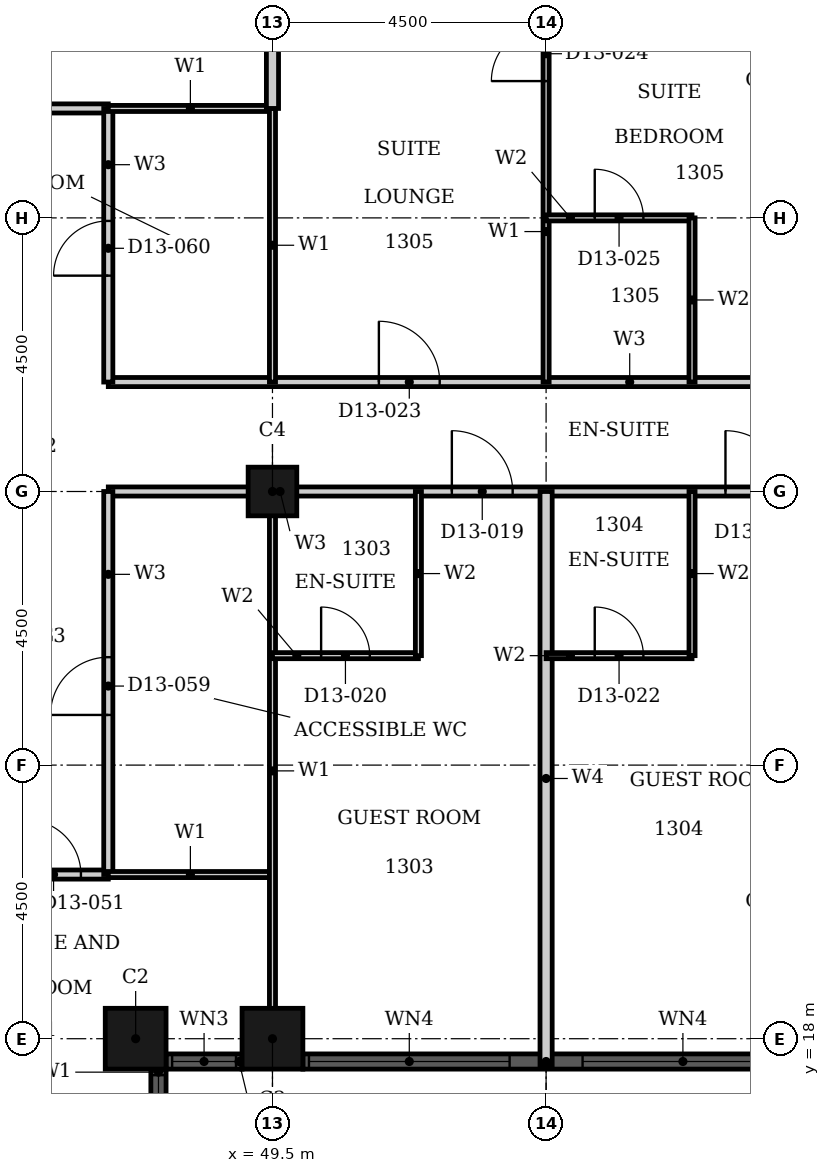
"""IFC4 building model, lengths in metres.
Left out: names, types, materials, properties, quantities, classifications, styles, units other than length and angle.
Written with IfcOpenShell. Run it as: python <this file> out.ifc"""

import sys

from ifc_helpers import new_model, si_unit, direction, frame, frame_2d, origin, origin_2d, place, context, subcontext, project, spatial, rectangle, hollow_rectangle, extrude, element, fill, save


model = new_model("IFC4")
c1 = context("Model", 3, precision=1e-05, world=origin(), true_north=direction((0.0, 1.0)))
c2 = subcontext(c1, "Body", "Model", "MODEL_VIEW")
j1 = project(units=[si_unit("LENGTHUNIT", "METRE"), si_unit("PLANEANGLEUNIT", "RADIAN")], contexts=[c1])
p1 = place(None, origin())
s1 = spatial("IfcSite", under=j1, at=p1, CompositionType="ELEMENT")
p2 = place(p1, origin())
s2 = spatial("IfcBuilding", under=s1, at=p2, CompositionType="ELEMENT")
p3 = place(p2, frame((0.0, 0.0, 60.0)))
s3 = spatial("IfcBuildingStorey", under=s2, at=p3, CompositionType="ELEMENT", Elevation=60.0)
for number, where, z_axis, x_axis in (
    (1, (47.25, 18.0, 0.0), (0.0, 0.0, 1.0), (1.0, 0.0, 0.0)),
    (2, (49.5, 18.0, 0.0), (0.0, 0.0, 1.0), (1.0, 0.0, 0.0)),
):
    element("IfcColumn", number, at=place(p3, frame(where, z_axis=z_axis, x_axis=x_axis)), inside=s3, PredefinedType="COLUMN", context=c2, shape_type="SweptSolid", body=[
        extrude(hollow_rectangle(XDim=1.0, YDim=1.0, WallThickness=0.032, at=origin_2d()), origin(), (0.0, 0.0, 1.0), 3.6),
    ])
p4 = place(p3, frame((49.5, 27.0, 0.0), z_axis=(0.0, 0.0, 1.0), x_axis=(1.0, 0.0, 0.0)))
e3 = element("IfcColumn", 3, at=p4, inside=s3, PredefinedType="COLUMN", context=c2, shape_type="SweptSolid", body=[
    extrude(hollow_rectangle(XDim=0.8, YDim=0.8, WallThickness=0.025, at=origin_2d()), origin(), (0.0, 0.0, 1.0), 3.6),
])
p5 = place(p3, frame((47.625, 16.25, 0.0), z_axis=(0.0, 0.0, 1.0), x_axis=(0.0, 1.0, 0.0)))
e4 = element("IfcWall", 4, at=p5, inside=s3, PredefinedType="SOLIDWALL", context=c2, shape_type="SweptSolid", body=[
    extrude(rectangle(XDim=1.25, YDim=0.25, at=frame_2d((0.625, 0.0))), origin(), (0.0, 0.0, 1.0), 3.6),
])
p6 = place(p5, frame((0.1, 0.0, 0.9)))
e5 = element("IfcOpeningElement", 5, at=p6, cuts=e4, PredefinedType="OPENING", context=c2, shape_type="SweptSolid", body=[
    extrude(rectangle(XDim=1.05, YDim=2.08, at=frame_2d((0.525, 1.04))), frame((0.0, 0.135, 0.0), z_axis=(0.0, -1.0, 0.0), x_axis=(1.0, 0.0, 0.0)), (0.0, 0.0, 1.0), 0.27),
])
p7 = place(p3, frame((47.75, 17.625, 0.0), z_axis=(0.0, 0.0, 1.0), x_axis=(1.0, 0.0, 0.0)))
e6 = element("IfcWall", 6, at=p7, inside=s3, PredefinedType="SOLIDWALL", context=c2, shape_type="SweptSolid", body=[
    extrude(rectangle(XDim=1.25, YDim=0.25, at=frame_2d((0.625, 0.0))), origin(), (0.0, 0.0, 1.0), 3.6),
])
p8 = place(p7, frame((0.1, 0.0, 0.9)))
e7 = element("IfcOpeningElement", 7, at=p8, cuts=e6, PredefinedType="OPENING", context=c2, shape_type="SweptSolid", body=[
    extrude(rectangle(XDim=1.05, YDim=2.08, at=frame_2d((0.525, 1.04))), frame((0.0, 0.135, 0.0), z_axis=(0.0, -1.0, 0.0), x_axis=(1.0, 0.0, 0.0)), (0.0, 0.0, 1.0), 0.27),
])
p9 = place(p3, frame((50.0, 17.625, 0.0), z_axis=(0.0, 0.0, 1.0), x_axis=(1.0, 0.0, 0.0)))
e8 = element("IfcWall", 8, at=p9, inside=s3, PredefinedType="SOLIDWALL", context=c2, shape_type="SweptSolid", body=[
    extrude(rectangle(XDim=8.0, YDim=0.25, at=frame_2d((4.0, 0.0))), origin(), (0.0, 0.0, 1.0), 3.6),
])
p10 = place(p9, frame((0.1, 0.0, 0.9)))
e9 = element("IfcOpeningElement", 9, at=p10, cuts=e8, PredefinedType="OPENING", context=c2, shape_type="SweptSolid", body=[
    extrude(rectangle(XDim=3.3, YDim=2.08, at=frame_2d((1.65, 1.04))), frame((0.0, 0.135, 0.0), z_axis=(0.0, -1.0, 0.0), x_axis=(1.0, 0.0, 0.0)), (0.0, 0.0, 1.0), 0.27),
])
p11 = place(p9, frame((4.6, 0.0, 0.9)))
e10 = element("IfcOpeningElement", 10, at=p11, cuts=e8, PredefinedType="OPENING", context=c2, shape_type="SweptSolid", body=[
    extrude(rectangle(XDim=3.3, YDim=2.08, at=frame_2d((1.65, 1.04))), frame((0.0, 0.135, 0.0), z_axis=(0.0, -1.0, 0.0), x_axis=(1.0, 0.0, 0.0)), (0.0, 0.0, 1.0), 0.27),
])
p12 = place(p3, frame((31.5, 20.7, 0.0), z_axis=(0.0, 0.0, 1.0), x_axis=(1.0, 0.0, 0.0)))
e11 = element("IfcWall", 11, at=p12, inside=s3, PredefinedType="PARTITIONING", context=c2, shape_type="SweptSolid", body=[
    extrude(rectangle(XDim=15.3, YDim=0.15, at=frame_2d((7.65, 0.0))), origin(), (0.0, 0.0, 1.0), 3.3),
])
p13 = place(p12, frame((11.95, 0.0, 0.0)))
e12 = element("IfcOpeningElement", 12, at=p13, cuts=e11, PredefinedType="OPENING", context=c2, shape_type="SweptSolid", body=[
    extrude(rectangle(XDim=1.0, YDim=2.1, at=frame_2d((0.5, 1.05))), frame((0.0, 0.085, 0.0), z_axis=(0.0, -1.0, 0.0), x_axis=(1.0, 0.0, 0.0)), (0.0, 0.0, 1.0), 0.17),
])
p14 = place(p12, frame((13.95, 0.0, 0.0)))
e13 = element("IfcOpeningElement", 13, at=p14, cuts=e11, PredefinedType="OPENING", context=c2, shape_type="SweptSolid", body=[
    extrude(rectangle(XDim=0.9, YDim=2.1, at=frame_2d((0.45, 1.05))), frame((0.0, 0.085, 0.0), z_axis=(0.0, -1.0, 0.0), x_axis=(1.0, 0.0, 0.0)), (0.0, 0.0, 1.0), 0.17),
])
p15 = place(p12, frame((1.05, 0.0, 0.0)))
e14 = element("IfcOpeningElement", 14, at=p15, cuts=e11, PredefinedType="OPENING", context=c2, shape_type="SweptSolid", body=[
    extrude(rectangle(XDim=0.9, YDim=2.1, at=frame_2d((0.45, 1.05))), frame((0.0, 0.085, 0.0), z_axis=(0.0, -1.0, 0.0), x_axis=(1.0, 0.0, 0.0)), (0.0, 0.0, 1.0), 0.17),
])
p16 = place(p12, frame((5.55, 0.0, 0.0)))
e15 = element("IfcOpeningElement", 15, at=p16, cuts=e11, PredefinedType="OPENING", context=c2, shape_type="SweptSolid", body=[
    extrude(rectangle(XDim=0.9, YDim=2.1, at=frame_2d((0.45, 1.05))), frame((0.0, 0.085, 0.0), z_axis=(0.0, -1.0, 0.0), x_axis=(1.0, 0.0, 0.0)), (0.0, 0.0, 1.0), 0.17),
])
p17 = place(p3, frame((46.8, 27.0, 0.0), z_axis=(0.0, 0.0, 1.0), x_axis=(1.0, 0.0, 0.0)))
e16 = element("IfcWall", 16, at=p17, inside=s3, PredefinedType="PARTITIONING", context=c2, shape_type="SweptSolid", body=[
    extrude(rectangle(XDim=11.7, YDim=0.15, at=frame_2d((5.85, 0.0))), origin(), (0.0, 0.0, 1.0), 2.58),
])
p18 = place(p17, frame((5.65, 0.0, 0.0)))
e17 = element("IfcOpeningElement", 17, at=p18, cuts=e16, PredefinedType="OPENING", context=c2, shape_type="SweptSolid", body=[
    extrude(rectangle(XDim=1.0, YDim=2.1, at=frame_2d((0.5, 1.05))), frame((0.0, 0.085, 0.0), z_axis=(0.0, -1.0, 0.0), x_axis=(1.0, 0.0, 0.0)), (0.0, 0.0, 1.0), 0.17),
])
p19 = place(p17, frame((10.15, 0.0, 0.0)))
e18 = element("IfcOpeningElement", 18, at=p19, cuts=e16, PredefinedType="OPENING", context=c2, shape_type="SweptSolid", body=[
    extrude(rectangle(XDim=1.0, YDim=2.1, at=frame_2d((0.5, 1.05))), frame((0.0, 0.085, 0.0), z_axis=(0.0, -1.0, 0.0), x_axis=(1.0, 0.0, 0.0)), (0.0, 0.0, 1.0), 0.17),
])
p20 = place(p3, frame((46.8, 28.8, 0.0), z_axis=(0.0, 0.0, 1.0), x_axis=(1.0, 0.0, 0.0)))
e19 = element("IfcWall", 19, at=p20, inside=s3, PredefinedType="PARTITIONING", context=c2, shape_type="SweptSolid", body=[
    extrude(rectangle(XDim=11.7, YDim=0.15, at=frame_2d((5.85, 0.0))), origin(), (0.0, 0.0, 1.0), 3.3),
])
p21 = place(p20, frame((4.45, 0.0, 0.0)))
e20 = element("IfcOpeningElement", 20, at=p21, cuts=e19, PredefinedType="OPENING", context=c2, shape_type="SweptSolid", body=[
    extrude(rectangle(XDim=1.0, YDim=2.1, at=frame_2d((0.5, 1.05))), frame((0.0, 0.085, 0.0), z_axis=(0.0, -1.0, 0.0), x_axis=(1.0, 0.0, 0.0)), (0.0, 0.0, 1.0), 0.17),
])
p22 = place(p3, frame((33.3, 33.3, 0.0), z_axis=(0.0, 0.0, 1.0), x_axis=(1.0, 0.0, 0.0)))
e21 = element("IfcWall", 21, at=p22, inside=s3, PredefinedType="PARTITIONING", context=c2, shape_type="SweptSolid", body=[
    extrude(rectangle(XDim=13.5, YDim=0.15, at=frame_2d((6.75, 0.0))), origin(), (0.0, 0.0, 1.0), 3.3),
])
p23 = place(p22, frame((10.15, 0.0, 0.0)))
e22 = element("IfcOpeningElement", 22, at=p23, cuts=e21, PredefinedType="OPENING", context=c2, shape_type="SweptSolid", body=[
    extrude(rectangle(XDim=1.0, YDim=2.1, at=frame_2d((0.5, 1.05))), frame((0.0, 0.085, 0.0), z_axis=(0.0, -1.0, 0.0), x_axis=(1.0, 0.0, 0.0)), (0.0, 0.0, 1.0), 0.17),
])
p24 = place(p22, frame((3.15, 0.0, 0.0)))
e23 = element("IfcOpeningElement", 23, at=p24, cuts=e21, PredefinedType="OPENING", context=c2, shape_type="SweptSolid", body=[
    extrude(rectangle(XDim=0.9, YDim=2.1, at=frame_2d((0.45, 1.05))), frame((0.0, 0.085, 0.0), z_axis=(0.0, -1.0, 0.0), x_axis=(1.0, 0.0, 0.0)), (0.0, 0.0, 1.0), 0.17),
])
p25 = place(p3, frame((46.8, 28.8, 0.0), z_axis=(0.0, 0.0, 1.0), x_axis=(0.0, 1.0, 0.0)))
e24 = element("IfcWall", 24, at=p25, inside=s3, PredefinedType="PARTITIONING", context=c2, shape_type="SweptSolid", body=[
    extrude(rectangle(XDim=4.5, YDim=0.15, at=frame_2d((2.25, 0.0))), origin(), (0.0, 0.0, 1.0), 3.3),
])
p26 = place(p25, frame((1.75, 0.0, 0.0)))
e25 = element("IfcOpeningElement", 25, at=p26, cuts=e24, PredefinedType="OPENING", context=c2, shape_type="SweptSolid", body=[
    extrude(rectangle(XDim=0.9, YDim=2.1, at=frame_2d((0.45, 1.05))), frame((0.0, 0.085, 0.0), z_axis=(0.0, -1.0, 0.0), x_axis=(1.0, 0.0, 0.0)), (0.0, 0.0, 1.0), 0.17),
])
p27 = place(p3, frame((46.8, 20.7, 0.0), z_axis=(0.0, 0.0, 1.0), x_axis=(0.0, 1.0, 0.0)))
e26 = element("IfcWall", 26, at=p27, inside=s3, PredefinedType="PARTITIONING", context=c2, shape_type="SweptSolid", body=[
    extrude(rectangle(XDim=6.3, YDim=0.15, at=frame_2d((3.15, 0.0))), origin(), (0.0, 0.0, 1.0), 3.3),
])
p28 = place(p27, frame((2.625, 0.0, 0.0)))
e27 = element("IfcOpeningElement", 27, at=p28, cuts=e26, PredefinedType="OPENING", context=c2, shape_type="SweptSolid", body=[
    extrude(rectangle(XDim=0.95, YDim=2.1, at=frame_2d((0.475, 1.05))), frame((0.0, 0.085, 0.0), z_axis=(0.0, -1.0, 0.0), x_axis=(1.0, 0.0, 0.0)), (0.0, 0.0, 1.0), 0.17),
])
for number, where, z_axis, x_axis in (
    (28, (46.8, 20.7, 0.0), (0.0, 0.0, 1.0), (1.0, 0.0, 0.0)),
    (29, (46.8, 33.3, 0.0), (0.0, 0.0, 1.0), (1.0, 0.0, 0.0)),
):
    element("IfcWall", number, at=place(p3, frame(where, z_axis=z_axis, x_axis=x_axis)), inside=s3, PredefinedType="PARTITIONING", context=c2, shape_type="SweptSolid", body=[
        extrude(rectangle(XDim=2.7, YDim=0.1, at=frame_2d((1.35, 0.0))), origin(), (0.0, 0.0, 1.0), 3.3),
    ])
p29 = place(p3, frame((49.5, 17.81, 0.0), z_axis=(0.0, 0.0, 1.0), x_axis=(0.0, 1.0, 0.0)))
e30 = element("IfcWall", 30, at=p29, inside=s3, PredefinedType="PARTITIONING", context=c2, shape_type="SweptSolid", body=[
    extrude(rectangle(XDim=9.19, YDim=0.1, at=frame_2d((4.595, 0.0))), origin(), (0.0, 0.0, 1.0), 2.38),
])
p30 = place(p3, frame((49.5, 28.8, 0.0), z_axis=(0.0, 0.0, 1.0), x_axis=(0.0, 1.0, 0.0)))
e31 = element("IfcWall", 31, at=p30, inside=s3, PredefinedType="PARTITIONING", context=c2, shape_type="SweptSolid", body=[
    extrude(rectangle(XDim=4.5, YDim=0.1, at=frame_2d((2.25, 0.0))), origin(), (0.0, 0.0, 1.0), 2.38),
])
p31 = place(p3, frame((54.0, 28.8, 0.0), z_axis=(0.0, 0.0, 1.0), x_axis=(0.0, 1.0, 0.0)))
e32 = element("IfcWall", 32, at=p31, inside=s3, PredefinedType="PARTITIONING", context=c2, shape_type="SweptSolid", body=[
    extrude(rectangle(XDim=7.64, YDim=0.1, at=frame_2d((3.82, 0.0))), origin(), (0.0, 0.0, 1.0), 3.3),
])
p32 = place(p31, frame((4.95, 0.0, 0.0)))
e33 = element("IfcOpeningElement", 33, at=p32, cuts=e32, PredefinedType="OPENING", context=c2, shape_type="SweptSolid", body=[
    extrude(rectangle(XDim=0.9, YDim=2.1, at=frame_2d((0.45, 1.05))), frame((0.0, 0.06, 0.0), z_axis=(0.0, -1.0, 0.0), x_axis=(1.0, 0.0, 0.0)), (0.0, 0.0, 1.0), 0.12),
])
p33 = place(p3, frame((49.5, 33.3, 0.0), z_axis=(0.0, 0.0, 1.0), x_axis=(0.0, 1.0, 0.0)))
e34 = element("IfcWall", 34, at=p33, inside=s3, PredefinedType="PARTITIONING", context=c2, shape_type="SweptSolid", body=[
    extrude(rectangle(XDim=2.89, YDim=0.2, at=frame_2d((1.445, 0.0))), origin(), (0.0, 0.0, 1.0), 2.38),
])
p34 = place(p3, frame((54.0, 17.56, 0.0), z_axis=(0.0, 0.0, 1.0), x_axis=(0.0, 1.0, 0.0)))
e35 = element("IfcWall", 35, at=p34, inside=s3, PredefinedType="PARTITIONING", context=c2, shape_type="SweptSolid", body=[
    extrude(rectangle(XDim=9.44, YDim=0.2, at=frame_2d((4.72, 0.0))), origin(), (0.0, 0.0, 1.0), 3.3),
])
p35 = place(p3, frame((49.5, 24.3, 0.0), z_axis=(0.0, 0.0, 1.0), x_axis=(1.0, 0.0, 0.0)))
e36 = element("IfcWall", 36, at=p35, inside=s3, PredefinedType="PARTITIONING", context=c2, shape_type="SweptSolid", body=[
    extrude(rectangle(XDim=2.4, YDim=0.1, at=frame_2d((1.2, 0.0))), origin(), (0.0, 0.0, 1.0), 3.3),
])
p36 = place(p35, frame((0.8, 0.0, 0.0)))
e37 = element("IfcOpeningElement", 37, at=p36, cuts=e36, PredefinedType="OPENING", context=c2, shape_type="SweptSolid", body=[
    extrude(rectangle(XDim=0.8, YDim=2.1, at=frame_2d((0.4, 1.05))), frame((0.0, 0.06, 0.0), z_axis=(0.0, -1.0, 0.0), x_axis=(1.0, 0.0, 0.0)), (0.0, 0.0, 1.0), 0.12),
])
p37 = place(p3, frame((54.0, 24.3, 0.0), z_axis=(0.0, 0.0, 1.0), x_axis=(1.0, 0.0, 0.0)))
e38 = element("IfcWall", 38, at=p37, inside=s3, PredefinedType="PARTITIONING", context=c2, shape_type="SweptSolid", body=[
    extrude(rectangle(XDim=2.4, YDim=0.1, at=frame_2d((1.2, 0.0))), origin(), (0.0, 0.0, 1.0), 3.3),
])
p38 = place(p37, frame((0.8, 0.0, 0.0)))
e39 = element("IfcOpeningElement", 39, at=p38, cuts=e38, PredefinedType="OPENING", context=c2, shape_type="SweptSolid", body=[
    extrude(rectangle(XDim=0.8, YDim=2.1, at=frame_2d((0.4, 1.05))), frame((0.0, 0.06, 0.0), z_axis=(0.0, -1.0, 0.0), x_axis=(1.0, 0.0, 0.0)), (0.0, 0.0, 1.0), 0.12),
])
p39 = place(p3, frame((54.0, 31.5, 0.0), z_axis=(0.0, 0.0, 1.0), x_axis=(1.0, 0.0, 0.0)))
e40 = element("IfcWall", 40, at=p39, inside=s3, PredefinedType="PARTITIONING", context=c2, shape_type="SweptSolid", body=[
    extrude(rectangle(XDim=2.4, YDim=0.1, at=frame_2d((1.2, 0.0))), origin(), (0.0, 0.0, 1.0), 2.58),
])
p40 = place(p39, frame((0.8, 0.0, 0.0)))
e41 = element("IfcOpeningElement", 41, at=p40, cuts=e40, PredefinedType="OPENING", context=c2, shape_type="SweptSolid", body=[
    extrude(rectangle(XDim=0.8, YDim=2.1, at=frame_2d((0.4, 1.05))), frame((0.0, 0.06, 0.0), z_axis=(0.0, -1.0, 0.0), x_axis=(1.0, 0.0, 0.0)), (0.0, 0.0, 1.0), 0.12),
])
for number, where, z_axis, x_axis in (
    (42, (51.9, 24.3, 0.0), (0.0, 0.0, 1.0), (0.0, 1.0, 0.0)),
    (43, (56.4, 24.3, 0.0), (0.0, 0.0, 1.0), (0.0, 1.0, 0.0)),
    (44, (56.4, 28.8, 0.0), (0.0, 0.0, 1.0), (0.0, 1.0, 0.0)),
):
    element("IfcWall", number, at=place(p3, frame(where, z_axis=z_axis, x_axis=x_axis)), inside=s3, PredefinedType="PARTITIONING", context=c2, shape_type="SweptSolid", body=[
        extrude(rectangle(XDim=2.7, YDim=0.1, at=frame_2d((1.35, 0.0))), origin(), (0.0, 0.0, 1.0), 3.3),
    ])
p41 = place(p6, origin())
e45 = element("IfcWindow", 45, at=p41, inside=s3, PartitioningType="SINGLE_PANEL", PredefinedType="WINDOW", context=c2, shape_type="SweptSolid", body=[
    extrude(rectangle(XDim=1.05, YDim=2.08, at=frame_2d((0.525, 1.04))), frame((0.0, 0.03, 0.0), z_axis=(0.0, -1.0, 0.0), x_axis=(1.0, 0.0, 0.0)), (0.0, 0.0, 1.0), 0.06),
])
fill(e5, e45)
p42 = place(p8, origin())
e46 = element("IfcWindow", 46, at=p42, inside=s3, PartitioningType="SINGLE_PANEL", PredefinedType="WINDOW", context=c2, shape_type="SweptSolid", body=[
    extrude(rectangle(XDim=1.05, YDim=2.08, at=frame_2d((0.525, 1.04))), frame((0.0, 0.03, 0.0), z_axis=(0.0, -1.0, 0.0), x_axis=(1.0, 0.0, 0.0)), (0.0, 0.0, 1.0), 0.06),
])
fill(e7, e46)
p43 = place(p10, origin())
e47 = element("IfcWindow", 47, at=p43, inside=s3, PartitioningType="SINGLE_PANEL", PredefinedType="WINDOW", context=c2, shape_type="SweptSolid", body=[
    extrude(rectangle(XDim=3.3, YDim=2.08, at=frame_2d((1.65, 1.04))), frame((0.0, 0.03, 0.0), z_axis=(0.0, -1.0, 0.0), x_axis=(1.0, 0.0, 0.0)), (0.0, 0.0, 1.0), 0.06),
])
fill(e9, e47)
p44 = place(p11, origin())
e48 = element("IfcWindow", 48, at=p44, inside=s3, PartitioningType="SINGLE_PANEL", PredefinedType="WINDOW", context=c2, shape_type="SweptSolid", body=[
    extrude(rectangle(XDim=3.3, YDim=2.08, at=frame_2d((1.65, 1.04))), frame((0.0, 0.03, 0.0), z_axis=(0.0, -1.0, 0.0), x_axis=(1.0, 0.0, 0.0)), (0.0, 0.0, 1.0), 0.06),
])
fill(e10, e48)
p45 = place(p18, origin())
e49 = element("IfcDoor", 49, at=p45, inside=s3, OperationType="SINGLE_SWING_RIGHT", PredefinedType="DOOR", context=c2, shape_type="SweptSolid", body=[
    extrude(rectangle(XDim=1.0, YDim=2.1, at=frame_2d((0.5, 1.05))), frame((0.0, 0.025, 0.0), z_axis=(0.0, -1.0, 0.0), x_axis=(1.0, 0.0, 0.0)), (0.0, 0.0, 1.0), 0.05),
])
fill(e17, e49)
p46 = place(p36, origin())
e50 = element("IfcDoor", 50, at=p46, inside=s3, OperationType="SINGLE_SWING_LEFT", PredefinedType="DOOR", context=c2, shape_type="SweptSolid", body=[
    extrude(rectangle(XDim=0.8, YDim=2.1, at=frame_2d((0.4, 1.05))), frame((0.0, 0.025, 0.0), z_axis=(0.0, -1.0, 0.0), x_axis=(1.0, 0.0, 0.0)), (0.0, 0.0, 1.0), 0.05),
])
fill(e37, e50)
p47 = place(p19, origin())
e51 = element("IfcDoor", 51, at=p47, inside=s3, OperationType="SINGLE_SWING_RIGHT", PredefinedType="DOOR", context=c2, shape_type="SweptSolid", body=[
    extrude(rectangle(XDim=1.0, YDim=2.1, at=frame_2d((0.5, 1.05))), frame((0.0, 0.025, 0.0), z_axis=(0.0, -1.0, 0.0), x_axis=(1.0, 0.0, 0.0)), (0.0, 0.0, 1.0), 0.05),
])
fill(e18, e51)
p48 = place(p38, origin())
e52 = element("IfcDoor", 52, at=p48, inside=s3, OperationType="SINGLE_SWING_RIGHT", PredefinedType="DOOR", context=c2, shape_type="SweptSolid", body=[
    extrude(rectangle(XDim=0.8, YDim=2.1, at=frame_2d((0.4, 1.05))), frame((0.0, 0.025, 0.0), z_axis=(0.0, -1.0, 0.0), x_axis=(1.0, 0.0, 0.0)), (0.0, 0.0, 1.0), 0.05),
])
fill(e39, e52)
p49 = place(p21, origin())
e53 = element("IfcDoor", 53, at=p49, inside=s3, OperationType="SINGLE_SWING_RIGHT", PredefinedType="DOOR", context=c2, shape_type="SweptSolid", body=[
    extrude(rectangle(XDim=1.0, YDim=2.1, at=frame_2d((0.5, 1.05))), frame((0.0, 0.025, 0.0), z_axis=(0.0, -1.0, 0.0), x_axis=(1.0, 0.0, 0.0)), (0.0, 0.0, 1.0), 0.05),
])
fill(e20, e53)
p50 = place(p32, origin())
e54 = element("IfcDoor", 54, at=p50, inside=s3, OperationType="SINGLE_SWING_RIGHT", PredefinedType="DOOR", context=c2, shape_type="SweptSolid", body=[
    extrude(rectangle(XDim=0.9, YDim=2.1, at=frame_2d((0.45, 1.05))), frame((0.0, 0.025, 0.0), z_axis=(0.0, -1.0, 0.0), x_axis=(1.0, 0.0, 0.0)), (0.0, 0.0, 1.0), 0.05),
])
fill(e33, e54)
p51 = place(p40, origin())
e55 = element("IfcDoor", 55, at=p51, inside=s3, OperationType="SINGLE_SWING_LEFT", PredefinedType="DOOR", context=c2, shape_type="SweptSolid", body=[
    extrude(rectangle(XDim=0.8, YDim=2.1, at=frame_2d((0.4, 1.05))), frame((0.0, 0.025, 0.0), z_axis=(0.0, -1.0, 0.0), x_axis=(1.0, 0.0, 0.0)), (0.0, 0.0, 1.0), 0.05),
])
fill(e41, e55)
p52 = place(p14, origin())
e56 = element("IfcDoor", 56, at=p52, inside=s3, OperationType="SINGLE_SWING_RIGHT", PredefinedType="DOOR", context=c2, shape_type="SweptSolid", body=[
    extrude(rectangle(XDim=0.9, YDim=2.1, at=frame_2d((0.45, 1.05))), frame((0.0, 0.025, 0.0), z_axis=(0.0, -1.0, 0.0), x_axis=(1.0, 0.0, 0.0)), (0.0, 0.0, 1.0), 0.05),
])
fill(e13, e56)
p53 = place(p28, origin())
e57 = element("IfcDoor", 57, at=p53, inside=s3, OperationType="SINGLE_SWING_RIGHT", PredefinedType="DOOR", context=c2, shape_type="SweptSolid", body=[
    extrude(rectangle(XDim=0.95, YDim=2.1, at=frame_2d((0.475, 1.05))), frame((0.0, 0.025, 0.0), z_axis=(0.0, -1.0, 0.0), x_axis=(1.0, 0.0, 0.0)), (0.0, 0.0, 1.0), 0.05),
])
fill(e27, e57)
p54 = place(p26, origin())
e58 = element("IfcDoor", 58, at=p54, inside=s3, OperationType="SINGLE_SWING_LEFT", PredefinedType="DOOR", context=c2, shape_type="SweptSolid", body=[
    extrude(rectangle(XDim=0.9, YDim=2.1, at=frame_2d((0.45, 1.05))), frame((0.0, 0.025, 0.0), z_axis=(0.0, -1.0, 0.0), x_axis=(1.0, 0.0, 0.0)), (0.0, 0.0, 1.0), 0.05),
])
fill(e25, e58)
save(model, sys.argv[1])
